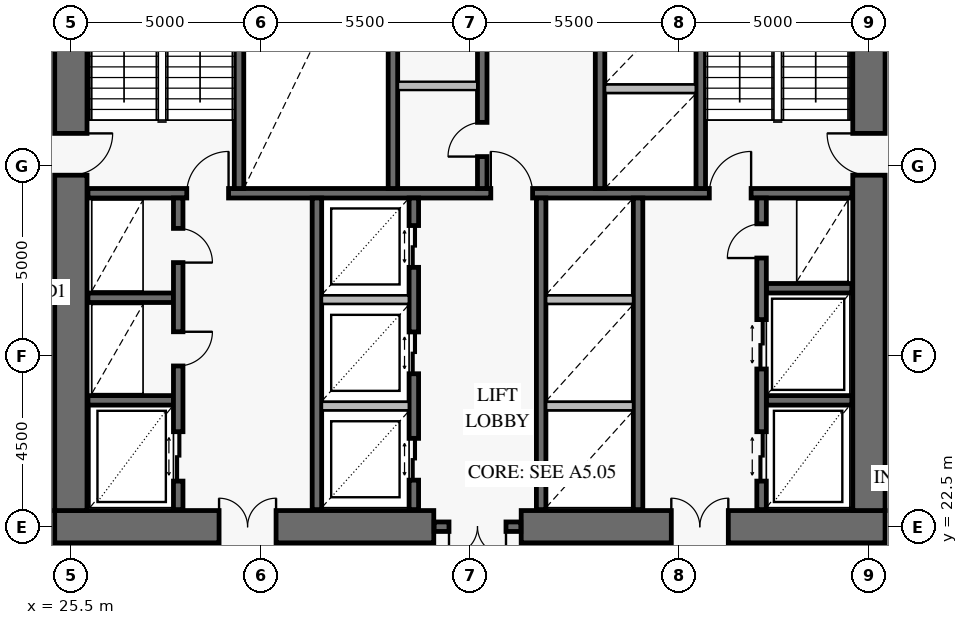
"""IFC4 building model, lengths in metres.
Left out: names, types, materials, properties, quantities, classifications, styles, units other than length and angle.
Written with IfcOpenShell. Run it as: python <this file> out.ifc"""

import sys

from ifc_helpers import new_model, si_unit, direction, frame, frame_2d, origin, place, context, subcontext, project, spatial, rectangle, extrude, element, fill, save


model = new_model("IFC4")
c1 = context("Model", 3, precision=1e-05, world=origin(), true_north=direction((0.0, 1.0)))
c2 = subcontext(c1, "Body", "Model", "MODEL_VIEW")
j1 = project(units=[si_unit("LENGTHUNIT", "METRE"), si_unit("PLANEANGLEUNIT", "RADIAN")], contexts=[c1])
p1 = place(None, origin())
s1 = spatial("IfcSite", under=j1, at=p1, CompositionType="ELEMENT")
p2 = place(p1, origin())
s2 = spatial("IfcBuilding", under=s1, at=p2, CompositionType="ELEMENT")
p3 = place(p2, frame((0.0, 0.0, 24.6)))
s3 = spatial("IfcBuildingStorey", under=s2, at=p3, CompositionType="ELEMENT", Elevation=24.6)
p4 = place(p3, frame((25.075, 22.5, 0.0), z_axis=(0.0, 0.0, 1.0), x_axis=(1.0, 0.0, 0.0)))
e1 = element("IfcWall", 1, at=p4, inside=s3, PredefinedType="SHEAR", context=c2, shape_type="SweptSolid", body=[
    extrude(rectangle(XDim=9.975, YDim=0.85, at=frame_2d((4.988, 0.0))), origin(), (0.0, 0.0, 1.0), 4.2),
])
p5 = place(p4, frame((4.325, 0.0, 0.0)))
e2 = element("IfcOpeningElement", 2, at=p5, cuts=e1, PredefinedType="OPENING", context=c2, shape_type="SweptSolid", body=[
    extrude(rectangle(XDim=1.5, YDim=2.15, at=frame_2d((0.75, 1.075))), frame((0.0, 0.437, 0.0), z_axis=(0.0, -1.0, 0.0), x_axis=(1.0, 0.0, 0.0)), (0.0, 0.0, 1.0), 0.874),
])
p6 = place(p3, frame((37.35, 22.5, 0.0), z_axis=(0.0, 0.0, 1.0), x_axis=(1.0, 0.0, 0.0)))
e3 = element("IfcWall", 3, at=p6, inside=s3, PredefinedType="SHEAR", context=c2, shape_type="SweptSolid", body=[
    extrude(rectangle(XDim=9.575, YDim=0.85, at=frame_2d((4.788, 0.0))), origin(), (0.0, 0.0, 1.0), 4.2),
])
p7 = place(p6, frame((3.95, 0.0, 0.0)))
e4 = element("IfcOpeningElement", 4, at=p7, cuts=e3, PredefinedType="OPENING", context=c2, shape_type="SweptSolid", body=[
    extrude(rectangle(XDim=1.5, YDim=2.15, at=frame_2d((0.75, 1.075))), frame((0.0, 0.437, 0.0), z_axis=(0.0, -1.0, 0.0), x_axis=(1.0, 0.0, 0.0)), (0.0, 0.0, 1.0), 0.874),
])
p8 = place(p3, frame((25.5, 22.925, 0.0), z_axis=(0.0, 0.0, 1.0), x_axis=(0.0, 1.0, 0.0)))
e5 = element("IfcWall", 5, at=p8, inside=s3, PredefinedType="SHEAR", context=c2, shape_type="SweptSolid", body=[
    extrude(rectangle(XDim=18.15, YDim=0.85, at=frame_2d((9.075, 0.0))), origin(), (0.0, 0.0, 1.0), 4.2),
])
p9 = place(p8, frame((8.825, 0.0, 0.0)))
e6 = element("IfcOpeningElement", 6, at=p9, cuts=e5, PredefinedType="OPENING", context=c2, shape_type="SweptSolid", body=[
    extrude(rectangle(XDim=1.1, YDim=2.15, at=frame_2d((0.55, 1.075))), frame((0.0, 0.437, 0.0), z_axis=(0.0, -1.0, 0.0), x_axis=(1.0, 0.0, 0.0)), (0.0, 0.0, 1.0), 0.874),
])
p10 = place(p3, frame((46.5, 22.925, 0.0), z_axis=(0.0, 0.0, 1.0), x_axis=(0.0, 1.0, 0.0)))
e7 = element("IfcWall", 7, at=p10, inside=s3, PredefinedType="SHEAR", context=c2, shape_type="SweptSolid", body=[
    extrude(rectangle(XDim=18.15, YDim=0.85, at=frame_2d((9.075, 0.0))), origin(), (0.0, 0.0, 1.0), 4.2),
])
p11 = place(p10, frame((8.825, 0.0, 0.0)))
e8 = element("IfcOpeningElement", 8, at=p11, cuts=e7, PredefinedType="OPENING", context=c2, shape_type="SweptSolid", body=[
    extrude(rectangle(XDim=1.1, YDim=2.15, at=frame_2d((0.55, 1.075))), frame((0.0, 0.437, 0.0), z_axis=(0.0, -1.0, 0.0), x_axis=(1.0, 0.0, 0.0)), (0.0, 0.0, 1.0), 0.874),
])
p12 = place(p3, frame((35.06, 22.5, 0.0), z_axis=(0.0, 0.0, 1.0), x_axis=(1.0, 0.0, 0.0)))
e9 = element("IfcWall", 9, at=p12, inside=s3, PredefinedType="SOLIDWALL", context=c2, shape_type="SweptSolid", body=[
    extrude(rectangle(XDim=2.28, YDim=0.25, at=frame_2d((1.14, 0.0))), origin(), (0.0, 0.0, 1.0), 4.2),
])
p13 = place(p12, frame((0.39, 0.0, 0.0)))
e10 = element("IfcOpeningElement", 10, at=p13, cuts=e9, PredefinedType="OPENING", context=c2, shape_type="SweptSolid", body=[
    extrude(rectangle(XDim=1.5, YDim=2.15, at=frame_2d((0.75, 1.075))), frame((0.0, 0.137, 0.0), z_axis=(0.0, -1.0, 0.0), x_axis=(1.0, 0.0, 0.0)), (0.0, 0.0, 1.0), 0.274),
])
p14 = place(p3, frame((25.95, 31.275, 0.0), z_axis=(0.0, 0.0, 1.0), x_axis=(1.0, 0.0, 0.0)))
e11 = element("IfcWall", 11, at=p14, inside=s3, PredefinedType="SOLIDWALL", context=c2, shape_type="SweptSolid", body=[
    extrude(rectangle(XDim=20.1, YDim=0.25, at=frame_2d((10.05, 0.0))), origin(), (0.0, 0.0, 1.0), 4.2),
])
p15 = place(p14, frame((2.6, 0.0, 0.0)))
e12 = element("IfcOpeningElement", 12, at=p15, cuts=e11, PredefinedType="OPENING", context=c2, shape_type="SweptSolid", body=[
    extrude(rectangle(XDim=1.1, YDim=2.15, at=frame_2d((0.55, 1.075))), frame((0.0, 0.137, 0.0), z_axis=(0.0, -1.0, 0.0), x_axis=(1.0, 0.0, 0.0)), (0.0, 0.0, 1.0), 0.274),
])
p16 = place(p14, frame((10.6, 0.0, 0.0)))
e13 = element("IfcOpeningElement", 13, at=p16, cuts=e11, PredefinedType="OPENING", context=c2, shape_type="SweptSolid", body=[
    extrude(rectangle(XDim=1.1, YDim=2.15, at=frame_2d((0.55, 1.075))), frame((0.0, 0.137, 0.0), z_axis=(0.0, -1.0, 0.0), x_axis=(1.0, 0.0, 0.0)), (0.0, 0.0, 1.0), 0.274),
])
p17 = place(p14, frame((16.35, 0.0, 0.0)))
e14 = element("IfcOpeningElement", 14, at=p17, cuts=e11, PredefinedType="OPENING", context=c2, shape_type="SweptSolid", body=[
    extrude(rectangle(XDim=1.1, YDim=2.15, at=frame_2d((0.55, 1.075))), frame((0.0, 0.137, 0.0), z_axis=(0.0, -1.0, 0.0), x_axis=(1.0, 0.0, 0.0)), (0.0, 0.0, 1.0), 0.274),
])
for number, where, z_axis, x_axis in (
    (15, (29.925, 31.4, 0.0), (0.0, 0.0, 1.0), (0.0, 1.0, 0.0)),
    (16, (33.975, 31.4, 0.0), (0.0, 0.0, 1.0), (0.0, 1.0, 0.0)),
    (17, (42.075, 31.4, 0.0), (0.0, 0.0, 1.0), (0.0, 1.0, 0.0)),
):
    element("IfcWall", number, at=place(p3, frame(where, z_axis=z_axis, x_axis=x_axis)), inside=s3, PredefinedType="SOLIDWALL", context=c2, shape_type="SweptSolid", body=[
        extrude(rectangle(XDim=9.7, YDim=0.25, at=frame_2d((4.85, 0.0))), origin(), (0.0, 0.0, 1.0), 4.2),
    ])
p18 = place(p3, frame((36.325, 31.4, 0.0), z_axis=(0.0, 0.0, 1.0), x_axis=(0.0, 1.0, 0.0)))
e18 = element("IfcWall", 18, at=p18, inside=s3, PredefinedType="SOLIDWALL", context=c2, shape_type="SweptSolid", body=[
    extrude(rectangle(XDim=9.65, YDim=0.25, at=frame_2d((4.825, 0.0))), origin(), (0.0, 0.0, 1.0), 4.2),
])
p19 = place(p18, frame((0.84, 0.0, 0.0)))
e19 = element("IfcOpeningElement", 19, at=p19, cuts=e18, PredefinedType="OPENING", context=c2, shape_type="SweptSolid", body=[
    extrude(rectangle(XDim=0.9, YDim=2.1, at=frame_2d((0.45, 1.05))), frame((0.0, 0.137, 0.0), z_axis=(0.0, -1.0, 0.0), x_axis=(1.0, 0.0, 0.0)), (0.0, 0.0, 1.0), 0.274),
])
p20 = place(p18, frame((4.1, 0.0, 0.0)))
e20 = element("IfcOpeningElement", 20, at=p20, cuts=e18, PredefinedType="OPENING", context=c2, shape_type="SweptSolid", body=[
    extrude(rectangle(XDim=0.9, YDim=2.1, at=frame_2d((0.45, 1.05))), frame((0.0, 0.137, 0.0), z_axis=(0.0, -1.0, 0.0), x_axis=(1.0, 0.0, 0.0)), (0.0, 0.0, 1.0), 0.274),
])
p21 = place(p18, frame((7.61, 0.0, 0.0)))
e21 = element("IfcOpeningElement", 21, at=p21, cuts=e18, PredefinedType="OPENING", context=c2, shape_type="SweptSolid", body=[
    extrude(rectangle(XDim=0.9, YDim=2.1, at=frame_2d((0.45, 1.05))), frame((0.0, 0.137, 0.0), z_axis=(0.0, -1.0, 0.0), x_axis=(1.0, 0.0, 0.0)), (0.0, 0.0, 1.0), 0.274),
])
p22 = place(p3, frame((39.425, 31.4, 0.0), z_axis=(0.0, 0.0, 1.0), x_axis=(0.0, 1.0, 0.0)))
e22 = element("IfcWall", 22, at=p22, inside=s3, PredefinedType="SOLIDWALL", context=c2, shape_type="SweptSolid", body=[
    extrude(rectangle(XDim=9.65, YDim=0.25, at=frame_2d((4.825, 0.0))), origin(), (0.0, 0.0, 1.0), 4.2),
])
p23 = place(p22, frame((8.47, 0.0, 0.0)))
e23 = element("IfcOpeningElement", 23, at=p23, cuts=e22, PredefinedType="OPENING", context=c2, shape_type="SweptSolid", body=[
    extrude(rectangle(XDim=0.9, YDim=2.1, at=frame_2d((0.45, 1.05))), frame((0.0, 0.137, 0.0), z_axis=(0.0, -1.0, 0.0), x_axis=(1.0, 0.0, 0.0)), (0.0, 0.0, 1.0), 0.274),
])
for number, where, z_axis, x_axis in (
    (24, (25.95, 25.825, 0.0), (0.0, 0.0, 1.0), (1.0, 0.0, 0.0)),
    (25, (25.95, 28.525, 0.0), (0.0, 0.0, 1.0), (1.0, 0.0, 0.0)),
):
    element("IfcWall", number, at=place(p3, frame(where, z_axis=z_axis, x_axis=x_axis)), inside=s3, PredefinedType="SOLIDWALL", context=c2, shape_type="SweptSolid", body=[
        extrude(rectangle(XDim=2.25, YDim=0.25, at=frame_2d((1.125, 0.0))), origin(), (0.0, 0.0, 1.0), 4.2),
    ])
p24 = place(p3, frame((28.325, 22.95, 0.0), z_axis=(0.0, 0.0, 1.0), x_axis=(0.0, 1.0, 0.0)))
e26 = element("IfcWall", 26, at=p24, inside=s3, PredefinedType="SOLIDWALL", context=c2, shape_type="SweptSolid", body=[
    extrude(rectangle(XDim=8.2, YDim=0.25, at=frame_2d((4.1, 0.0))), origin(), (0.0, 0.0, 1.0), 4.2),
])
p25 = place(p24, frame((0.75, 0.0, 0.0)))
e27 = element("IfcOpeningElement", 27, at=p25, cuts=e26, PredefinedType="OPENING", context=c2, shape_type="SweptSolid", body=[
    extrude(rectangle(XDim=1.3, YDim=2.3, at=frame_2d((0.65, 1.15))), frame((0.0, 0.137, 0.0), z_axis=(0.0, -1.0, 0.0), x_axis=(1.0, 0.0, 0.0)), (0.0, 0.0, 1.0), 0.274),
])
p26 = place(p24, frame((3.78, 0.0, 0.0)))
e28 = element("IfcOpeningElement", 28, at=p26, cuts=e26, PredefinedType="OPENING", context=c2, shape_type="SweptSolid", body=[
    extrude(rectangle(XDim=0.9, YDim=2.1, at=frame_2d((0.45, 1.05))), frame((0.0, 0.137, 0.0), z_axis=(0.0, -1.0, 0.0), x_axis=(1.0, 0.0, 0.0)), (0.0, 0.0, 1.0), 0.274),
])
p27 = place(p24, frame((6.5, 0.0, 0.0)))
e29 = element("IfcOpeningElement", 29, at=p27, cuts=e26, PredefinedType="OPENING", context=c2, shape_type="SweptSolid", body=[
    extrude(rectangle(XDim=0.9, YDim=2.1, at=frame_2d((0.45, 1.05))), frame((0.0, 0.137, 0.0), z_axis=(0.0, -1.0, 0.0), x_axis=(1.0, 0.0, 0.0)), (0.0, 0.0, 1.0), 0.274),
])
p28 = place(p3, frame((31.975, 22.95, 0.0), z_axis=(0.0, 0.0, 1.0), x_axis=(0.0, 1.0, 0.0)))
e30 = element("IfcWall", 30, at=p28, inside=s3, PredefinedType="SOLIDWALL", context=c2, shape_type="SweptSolid", body=[
    extrude(rectangle(XDim=8.2, YDim=0.25, at=frame_2d((4.1, 0.0))), origin(), (0.0, 0.0, 1.0), 4.2),
])
p29 = place(p3, frame((34.525, 22.95, 0.0), z_axis=(0.0, 0.0, 1.0), x_axis=(0.0, 1.0, 0.0)))
e31 = element("IfcWall", 31, at=p29, inside=s3, PredefinedType="SOLIDWALL", context=c2, shape_type="SweptSolid", body=[
    extrude(rectangle(XDim=8.2, YDim=0.25, at=frame_2d((4.1, 0.0))), origin(), (0.0, 0.0, 1.0), 4.2),
])
p30 = place(p29, frame((0.775, 0.0, 0.0)))
e32 = element("IfcOpeningElement", 32, at=p30, cuts=e31, PredefinedType="OPENING", context=c2, shape_type="SweptSolid", body=[
    extrude(rectangle(XDim=1.1, YDim=2.2, at=frame_2d((0.55, 1.1))), frame((0.0, 0.137, 0.0), z_axis=(0.0, -1.0, 0.0), x_axis=(1.0, 0.0, 0.0)), (0.0, 0.0, 1.0), 0.274),
])
p31 = place(p29, frame((3.575, 0.0, 0.0)))
e33 = element("IfcOpeningElement", 33, at=p31, cuts=e31, PredefinedType="OPENING", context=c2, shape_type="SweptSolid", body=[
    extrude(rectangle(XDim=1.1, YDim=2.2, at=frame_2d((0.55, 1.1))), frame((0.0, 0.137, 0.0), z_axis=(0.0, -1.0, 0.0), x_axis=(1.0, 0.0, 0.0)), (0.0, 0.0, 1.0), 0.274),
])
p32 = place(p29, frame((6.375, 0.0, 0.0)))
e34 = element("IfcOpeningElement", 34, at=p32, cuts=e31, PredefinedType="OPENING", context=c2, shape_type="SweptSolid", body=[
    extrude(rectangle(XDim=1.1, YDim=2.2, at=frame_2d((0.55, 1.1))), frame((0.0, 0.137, 0.0), z_axis=(0.0, -1.0, 0.0), x_axis=(1.0, 0.0, 0.0)), (0.0, 0.0, 1.0), 0.274),
])
for number, where, z_axis, x_axis in (
    (35, (37.875, 22.95, 0.0), (0.0, 0.0, 1.0), (0.0, 1.0, 0.0)),
    (36, (40.425, 22.95, 0.0), (0.0, 0.0, 1.0), (0.0, 1.0, 0.0)),
):
    element("IfcWall", number, at=place(p3, frame(where, z_axis=z_axis, x_axis=x_axis)), inside=s3, PredefinedType="SOLIDWALL", context=c2, shape_type="SweptSolid", body=[
        extrude(rectangle(XDim=8.2, YDim=0.25, at=frame_2d((4.1, 0.0))), origin(), (0.0, 0.0, 1.0), 4.2),
    ])
for number, where, z_axis, x_axis in (
    (37, (43.8, 25.825, 0.0), (0.0, 0.0, 1.0), (1.0, 0.0, 0.0)),
    (38, (43.8, 28.775, 0.0), (0.0, 0.0, 1.0), (1.0, 0.0, 0.0)),
):
    element("IfcWall", number, at=place(p3, frame(where, z_axis=z_axis, x_axis=x_axis)), inside=s3, PredefinedType="SOLIDWALL", context=c2, shape_type="SweptSolid", body=[
        extrude(rectangle(XDim=2.25, YDim=0.25, at=frame_2d((1.125, 0.0))), origin(), (0.0, 0.0, 1.0), 4.2),
    ])
p33 = place(p3, frame((43.675, 22.95, 0.0), z_axis=(0.0, 0.0, 1.0), x_axis=(0.0, 1.0, 0.0)))
e39 = element("IfcWall", 39, at=p33, inside=s3, PredefinedType="SOLIDWALL", context=c2, shape_type="SweptSolid", body=[
    extrude(rectangle(XDim=8.2, YDim=0.25, at=frame_2d((4.1, 0.0))), origin(), (0.0, 0.0, 1.0), 4.2),
])
p34 = place(p33, frame((0.75, 0.0, 0.0)))
e40 = element("IfcOpeningElement", 40, at=p34, cuts=e39, PredefinedType="OPENING", context=c2, shape_type="SweptSolid", body=[
    extrude(rectangle(XDim=1.3, YDim=2.3, at=frame_2d((0.65, 1.15))), frame((0.0, 0.137, 0.0), z_axis=(0.0, -1.0, 0.0), x_axis=(1.0, 0.0, 0.0)), (0.0, 0.0, 1.0), 0.274),
])
p35 = place(p33, frame((3.7, 0.0, 0.0)))
e41 = element("IfcOpeningElement", 41, at=p35, cuts=e39, PredefinedType="OPENING", context=c2, shape_type="SweptSolid", body=[
    extrude(rectangle(XDim=1.3, YDim=2.3, at=frame_2d((0.65, 1.15))), frame((0.0, 0.137, 0.0), z_axis=(0.0, -1.0, 0.0), x_axis=(1.0, 0.0, 0.0)), (0.0, 0.0, 1.0), 0.274),
])
p36 = place(p33, frame((6.62, 0.0, 0.0)))
e42 = element("IfcOpeningElement", 42, at=p36, cuts=e39, PredefinedType="OPENING", context=c2, shape_type="SweptSolid", body=[
    extrude(rectangle(XDim=0.9, YDim=2.1, at=frame_2d((0.45, 1.05))), frame((0.0, 0.137, 0.0), z_axis=(0.0, -1.0, 0.0), x_axis=(1.0, 0.0, 0.0)), (0.0, 0.0, 1.0), 0.274),
])
p37 = place(p3, frame((34.108, 34.1, 0.0), z_axis=(0.0, 0.0, 1.0), x_axis=(1.0, 0.0, 0.0)))
e43 = element("IfcWall", 43, at=p37, inside=s3, PredefinedType="PARTITIONING", context=c2, shape_type="SweptSolid", body=[
    extrude(rectangle(XDim=2.084, YDim=0.22, at=frame_2d((1.042, 0.0))), origin(), (0.0, 0.0, 1.0), 3.92),
])
p38 = place(p3, frame((39.558, 34.025, 0.0), z_axis=(0.0, 0.0, 1.0), x_axis=(1.0, 0.0, 0.0)))
e44 = element("IfcWall", 44, at=p38, inside=s3, PredefinedType="PARTITIONING", context=c2, shape_type="SweptSolid", body=[
    extrude(rectangle(XDim=2.384, YDim=0.22, at=frame_2d((1.192, 0.0))), origin(), (0.0, 0.0, 1.0), 3.92),
])
for number, where, z_axis, x_axis in (
    (45, (32.108, 25.675, 0.0), (0.0, 0.0, 1.0), (1.0, 0.0, 0.0)),
    (46, (32.108, 28.475, 0.0), (0.0, 0.0, 1.0), (1.0, 0.0, 0.0)),
):
    element("IfcWall", number, at=place(p3, frame(where, z_axis=z_axis, x_axis=x_axis)), inside=s3, PredefinedType="PARTITIONING", context=c2, shape_type="SweptSolid", body=[
        extrude(rectangle(XDim=2.284, YDim=0.22, at=frame_2d((1.142, 0.0))), origin(), (0.0, 0.0, 1.0), 3.92),
    ])
for number, where, z_axis, x_axis in (
    (47, (38.008, 25.675, 0.0), (0.0, 0.0, 1.0), (1.0, 0.0, 0.0)),
    (48, (38.008, 28.475, 0.0), (0.0, 0.0, 1.0), (1.0, 0.0, 0.0)),
):
    element("IfcWall", number, at=place(p3, frame(where, z_axis=z_axis, x_axis=x_axis)), inside=s3, PredefinedType="PARTITIONING", context=c2, shape_type="SweptSolid", body=[
        extrude(rectangle(XDim=2.284, YDim=0.22, at=frame_2d((1.142, 0.0))), origin(), (0.0, 0.0, 1.0), 3.92),
    ])
p39 = place(p9, frame((1.1, 0.0, 0.0), z_axis=(0.0, 0.0, 1.0), x_axis=(-1.0, 0.0, 0.0)))
e49 = element("IfcDoor", 49, at=p39, inside=s3, OperationType="SINGLE_SWING_LEFT", PredefinedType="USERDEFINED", context=c2, shape_type="SweptSolid", body=[
    extrude(rectangle(XDim=1.1, YDim=2.15, at=frame_2d((0.55, 1.075))), frame((0.0, 0.025, 0.0), z_axis=(0.0, -1.0, 0.0), x_axis=(1.0, 0.0, 0.0)), (0.0, 0.0, 1.0), 0.05),
])
fill(e6, e49)
p40 = place(p11, origin())
e50 = element("IfcDoor", 50, at=p40, inside=s3, OperationType="SINGLE_SWING_RIGHT", PredefinedType="USERDEFINED", context=c2, shape_type="SweptSolid", body=[
    extrude(rectangle(XDim=1.1, YDim=2.15, at=frame_2d((0.55, 1.075))), frame((0.0, 0.025, 0.0), z_axis=(0.0, -1.0, 0.0), x_axis=(1.0, 0.0, 0.0)), (0.0, 0.0, 1.0), 0.05),
])
fill(e8, e50)
p41 = place(p5, origin())
e51 = element("IfcDoor", 51, at=p41, inside=s3, OperationType="DOUBLE_DOOR_SINGLE_SWING", PredefinedType="DOOR", context=c2, shape_type="SweptSolid", body=[
    extrude(rectangle(XDim=1.5, YDim=2.15, at=frame_2d((0.75, 1.075))), frame((0.0, 0.025, 0.0), z_axis=(0.0, -1.0, 0.0), x_axis=(1.0, 0.0, 0.0)), (0.0, 0.0, 1.0), 0.05),
])
fill(e2, e51)
p42 = place(p7, origin())
e52 = element("IfcDoor", 52, at=p42, inside=s3, OperationType="DOUBLE_DOOR_SINGLE_SWING", PredefinedType="DOOR", context=c2, shape_type="SweptSolid", body=[
    extrude(rectangle(XDim=1.5, YDim=2.15, at=frame_2d((0.75, 1.075))), frame((0.0, 0.025, 0.0), z_axis=(0.0, -1.0, 0.0), x_axis=(1.0, 0.0, 0.0)), (0.0, 0.0, 1.0), 0.05),
])
fill(e4, e52)
p43 = place(p13, frame((1.5, 0.0, 0.0), z_axis=(0.0, 0.0, 1.0), x_axis=(-1.0, 0.0, 0.0)))
e53 = element("IfcDoor", 53, at=p43, inside=s3, OperationType="DOUBLE_DOOR_SINGLE_SWING", PredefinedType="DOOR", context=c2, shape_type="SweptSolid", body=[
    extrude(rectangle(XDim=1.5, YDim=2.15, at=frame_2d((0.75, 1.075))), frame((0.0, 0.025, 0.0), z_axis=(0.0, -1.0, 0.0), x_axis=(1.0, 0.0, 0.0)), (0.0, 0.0, 1.0), 0.05),
])
fill(e10, e53)
p44 = place(p15, origin())
e54 = element("IfcDoor", 54, at=p44, inside=s3, OperationType="SINGLE_SWING_RIGHT", PredefinedType="USERDEFINED", context=c2, shape_type="SweptSolid", body=[
    extrude(rectangle(XDim=1.1, YDim=2.15, at=frame_2d((0.55, 1.075))), frame((0.0, 0.025, 0.0), z_axis=(0.0, -1.0, 0.0), x_axis=(1.0, 0.0, 0.0)), (0.0, 0.0, 1.0), 0.05),
])
fill(e12, e54)
p45 = place(p16, origin())
e55 = element("IfcDoor", 55, at=p45, inside=s3, OperationType="SINGLE_SWING_LEFT", PredefinedType="USERDEFINED", context=c2, shape_type="SweptSolid", body=[
    extrude(rectangle(XDim=1.1, YDim=2.15, at=frame_2d((0.55, 1.075))), frame((0.0, 0.025, 0.0), z_axis=(0.0, -1.0, 0.0), x_axis=(1.0, 0.0, 0.0)), (0.0, 0.0, 1.0), 0.05),
])
fill(e13, e55)
p46 = place(p17, origin())
e56 = element("IfcDoor", 56, at=p46, inside=s3, OperationType="SINGLE_SWING_RIGHT", PredefinedType="USERDEFINED", context=c2, shape_type="SweptSolid", body=[
    extrude(rectangle(XDim=1.1, YDim=2.15, at=frame_2d((0.55, 1.075))), frame((0.0, 0.025, 0.0), z_axis=(0.0, -1.0, 0.0), x_axis=(1.0, 0.0, 0.0)), (0.0, 0.0, 1.0), 0.05),
])
fill(e14, e56)
p47 = place(p19, origin())
e57 = element("IfcDoor", 57, at=p47, inside=s3, OperationType="SINGLE_SWING_LEFT", PredefinedType="DOOR", context=c2, shape_type="SweptSolid", body=[
    extrude(rectangle(XDim=0.9, YDim=2.1, at=frame_2d((0.45, 1.05))), frame((0.0, 0.025, 0.0), z_axis=(0.0, -1.0, 0.0), x_axis=(1.0, 0.0, 0.0)), (0.0, 0.0, 1.0), 0.05),
])
fill(e19, e57)
p48 = place(p25, frame((1.3, 0.0, 0.0), z_axis=(0.0, 0.0, 1.0), x_axis=(-1.0, 0.0, 0.0)))
e58 = element("IfcDoor", 58, at=p48, inside=s3, OperationType="DOUBLE_DOOR_SLIDING", PredefinedType="DOOR", context=c2, shape_type="SweptSolid", body=[
    extrude(rectangle(XDim=1.3, YDim=2.3, at=frame_2d((0.65, 1.15))), frame((0.0, 0.025, 0.0), z_axis=(0.0, -1.0, 0.0), x_axis=(1.0, 0.0, 0.0)), (0.0, 0.0, 1.0), 0.05),
])
fill(e27, e58)
p49 = place(p26, frame((0.9, 0.0, 0.0), z_axis=(0.0, 0.0, 1.0), x_axis=(-1.0, 0.0, 0.0)))
e59 = element("IfcDoor", 59, at=p49, inside=s3, OperationType="SINGLE_SWING_LEFT", PredefinedType="DOOR", context=c2, shape_type="SweptSolid", body=[
    extrude(rectangle(XDim=0.9, YDim=2.1, at=frame_2d((0.45, 1.05))), frame((0.0, 0.025, 0.0), z_axis=(0.0, -1.0, 0.0), x_axis=(1.0, 0.0, 0.0)), (0.0, 0.0, 1.0), 0.05),
])
fill(e28, e59)
p50 = place(p27, frame((0.9, 0.0, 0.0), z_axis=(0.0, 0.0, 1.0), x_axis=(-1.0, 0.0, 0.0)))
e60 = element("IfcDoor", 60, at=p50, inside=s3, OperationType="SINGLE_SWING_RIGHT", PredefinedType="DOOR", context=c2, shape_type="SweptSolid", body=[
    extrude(rectangle(XDim=0.9, YDim=2.1, at=frame_2d((0.45, 1.05))), frame((0.0, 0.025, 0.0), z_axis=(0.0, -1.0, 0.0), x_axis=(1.0, 0.0, 0.0)), (0.0, 0.0, 1.0), 0.05),
])
fill(e29, e60)
p51 = place(p30, frame((1.1, 0.0, 0.0), z_axis=(0.0, 0.0, 1.0), x_axis=(-1.0, 0.0, 0.0)))
e61 = element("IfcDoor", 61, at=p51, inside=s3, OperationType="DOUBLE_DOOR_SLIDING", PredefinedType="DOOR", context=c2, shape_type="SweptSolid", body=[
    extrude(rectangle(XDim=1.1, YDim=2.2, at=frame_2d((0.55, 1.1))), frame((0.0, 0.025, 0.0), z_axis=(0.0, -1.0, 0.0), x_axis=(1.0, 0.0, 0.0)), (0.0, 0.0, 1.0), 0.05),
])
fill(e32, e61)
p52 = place(p31, frame((1.1, 0.0, 0.0), z_axis=(0.0, 0.0, 1.0), x_axis=(-1.0, 0.0, 0.0)))
e62 = element("IfcDoor", 62, at=p52, inside=s3, OperationType="DOUBLE_DOOR_SLIDING", PredefinedType="DOOR", context=c2, shape_type="SweptSolid", body=[
    extrude(rectangle(XDim=1.1, YDim=2.2, at=frame_2d((0.55, 1.1))), frame((0.0, 0.025, 0.0), z_axis=(0.0, -1.0, 0.0), x_axis=(1.0, 0.0, 0.0)), (0.0, 0.0, 1.0), 0.05),
])
fill(e33, e62)
p53 = place(p32, frame((1.1, 0.0, 0.0), z_axis=(0.0, 0.0, 1.0), x_axis=(-1.0, 0.0, 0.0)))
e63 = element("IfcDoor", 63, at=p53, inside=s3, OperationType="DOUBLE_DOOR_SLIDING", PredefinedType="DOOR", context=c2, shape_type="SweptSolid", body=[
    extrude(rectangle(XDim=1.1, YDim=2.2, at=frame_2d((0.55, 1.1))), frame((0.0, 0.025, 0.0), z_axis=(0.0, -1.0, 0.0), x_axis=(1.0, 0.0, 0.0)), (0.0, 0.0, 1.0), 0.05),
])
fill(e34, e63)
p54 = place(p34, origin())
e64 = element("IfcDoor", 64, at=p54, inside=s3, OperationType="DOUBLE_DOOR_SLIDING", PredefinedType="DOOR", context=c2, shape_type="SweptSolid", body=[
    extrude(rectangle(XDim=1.3, YDim=2.3, at=frame_2d((0.65, 1.15))), frame((0.0, 0.025, 0.0), z_axis=(0.0, -1.0, 0.0), x_axis=(1.0, 0.0, 0.0)), (0.0, 0.0, 1.0), 0.05),
])
fill(e40, e64)
p55 = place(p35, origin())
e65 = element("IfcDoor", 65, at=p55, inside=s3, OperationType="DOUBLE_DOOR_SLIDING", PredefinedType="DOOR", context=c2, shape_type="SweptSolid", body=[
    extrude(rectangle(XDim=1.3, YDim=2.3, at=frame_2d((0.65, 1.15))), frame((0.0, 0.025, 0.0), z_axis=(0.0, -1.0, 0.0), x_axis=(1.0, 0.0, 0.0)), (0.0, 0.0, 1.0), 0.05),
])
fill(e41, e65)
p56 = place(p36, origin())
e66 = element("IfcDoor", 66, at=p56, inside=s3, OperationType="SINGLE_SWING_LEFT", PredefinedType="DOOR", context=c2, shape_type="SweptSolid", body=[
    extrude(rectangle(XDim=0.9, YDim=2.1, at=frame_2d((0.45, 1.05))), frame((0.0, 0.025, 0.0), z_axis=(0.0, -1.0, 0.0), x_axis=(1.0, 0.0, 0.0)), (0.0, 0.0, 1.0), 0.05),
])
fill(e42, e66)
save(model, sys.argv[1])
